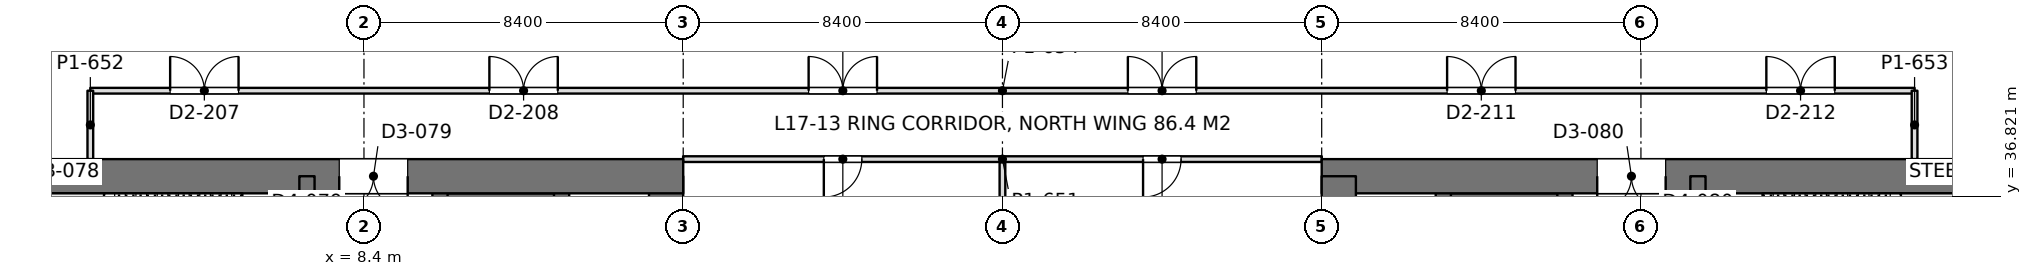
"""IFC4 building model, lengths in metres.
Left out: names, types, materials, properties, quantities, classifications, styles, units other than length and angle.
Written with IfcOpenShell. Run it as: python <this file> out.ifc"""

import sys

from ifc_helpers import new_model, si_unit, direction, frame, frame_2d, origin, place, context, subcontext, project, spatial, rectangle, extrude, element, fill, save


model = new_model("IFC4")
c1 = context("Model", 3, precision=1e-05, world=origin(), true_north=direction((0.0, 1.0)))
c2 = subcontext(c1, "Body", "Model", "MODEL_VIEW")
j1 = project(units=[si_unit("LENGTHUNIT", "METRE"), si_unit("PLANEANGLEUNIT", "RADIAN")], contexts=[c1])
p1 = place(None, origin())
s1 = spatial("IfcSite", under=j1, at=p1, CompositionType="ELEMENT")
p2 = place(p1, origin())
s2 = spatial("IfcBuilding", under=s1, at=p2, CompositionType="ELEMENT")
p3 = place(p2, frame((0.0, 0.0, 77.4)))
s3 = spatial("IfcBuildingStorey", under=s2, at=p3, CompositionType="ELEMENT", Elevation=77.4)
p4 = place(p3, frame((-1.2, 37.35, 0.0), z_axis=(0.0, 0.0, 1.0), x_axis=(1.0, 0.0, 0.0)))
e1 = element("IfcWall", 1, at=p4, inside=s3, PredefinedType="SHEAR", context=c2, shape_type="SweptSolid", body=[
    extrude(rectangle(XDim=18.0, YDim=0.9, at=frame_2d((9.0, 0.0))), origin(), (0.0, 0.0, 1.0), 4.5),
])
p5 = place(p4, frame((8.95, 0.0, 0.0)))
e2 = element("IfcOpeningElement", 2, at=p5, cuts=e1, PredefinedType="OPENING", context=c2, shape_type="SweptSolid", body=[
    extrude(rectangle(XDim=1.8, YDim=2.4, at=frame_2d((0.9, 1.2))), frame((0.0, 0.46, 0.0), z_axis=(0.0, -1.0, 0.0), x_axis=(1.0, 0.0, 0.0)), (0.0, 0.0, 1.0), 0.92),
])
p6 = place(p3, frame((16.35, 13.05, 0.0), z_axis=(0.0, 0.0, 1.0), x_axis=(0.0, 1.0, 0.0)))
e3 = element("IfcWall", 3, at=p6, inside=s3, PredefinedType="SHEAR", context=c2, shape_type="SweptSolid", body=[
    extrude(rectangle(XDim=24.3, YDim=0.9, at=frame_2d((12.15, 0.0))), origin(), (0.0, 0.0, 1.0), 4.5),
])
p7 = place(p3, frame((6.9, 13.05, 0.0), z_axis=(0.0, 0.0, 1.0), x_axis=(0.0, 1.0, 0.0)))
e4 = element("IfcWall", 4, at=p7, inside=s3, PredefinedType="SHEAR", context=c2, shape_type="SweptSolid", body=[
    extrude(rectangle(XDim=24.3, YDim=0.4, at=frame_2d((12.15, 0.0))), origin(), (0.0, 0.0, 1.0), 4.5),
])
p8 = place(p7, frame((1.3, 0.0, 0.0)))
e5 = element("IfcOpeningElement", 5, at=p8, cuts=e4, PredefinedType="OPENING", context=c2, shape_type="SweptSolid", body=[
    extrude(rectangle(XDim=1.0, YDim=2.2, at=frame_2d((0.5, 1.1))), frame((0.0, 0.21, 0.0), z_axis=(0.0, -1.0, 0.0), x_axis=(1.0, 0.0, 0.0)), (0.0, 0.0, 1.0), 0.42),
])
p9 = place(p7, frame((22.0, 0.0, 0.0)))
e6 = element("IfcOpeningElement", 6, at=p9, cuts=e4, PredefinedType="OPENING", context=c2, shape_type="SweptSolid", body=[
    extrude(rectangle(XDim=1.0, YDim=2.2, at=frame_2d((0.5, 1.1))), frame((0.0, 0.21, 0.0), z_axis=(0.0, -1.0, 0.0), x_axis=(1.0, 0.0, 0.0)), (0.0, 0.0, 1.0), 0.42),
])
p10 = place(p7, frame((5.55, 0.0, 0.0)))
e7 = element("IfcOpeningElement", 7, at=p10, cuts=e4, PredefinedType="OPENING", context=c2, shape_type="SweptSolid", body=[
    extrude(rectangle(XDim=1.0, YDim=2.2, at=frame_2d((0.5, 1.1))), frame((0.0, 0.21, 0.0), z_axis=(0.0, -1.0, 0.0), x_axis=(1.0, 0.0, 0.0)), (0.0, 0.0, 1.0), 0.42),
])
p11 = place(p7, frame((9.55, 0.0, 0.0)))
e8 = element("IfcOpeningElement", 8, at=p11, cuts=e4, PredefinedType="OPENING", context=c2, shape_type="SweptSolid", body=[
    extrude(rectangle(XDim=1.0, YDim=2.2, at=frame_2d((0.5, 1.1))), frame((0.0, 0.21, 0.0), z_axis=(0.0, -1.0, 0.0), x_axis=(1.0, 0.0, 0.0)), (0.0, 0.0, 1.0), 0.42),
])
p12 = place(p7, frame((12.8, 0.0, 0.0)))
e9 = element("IfcOpeningElement", 9, at=p12, cuts=e4, PredefinedType="OPENING", context=c2, shape_type="SweptSolid", body=[
    extrude(rectangle(XDim=1.1, YDim=2.2, at=frame_2d((0.55, 1.1))), frame((0.0, 0.21, 0.0), z_axis=(0.0, -1.0, 0.0), x_axis=(1.0, 0.0, 0.0)), (0.0, 0.0, 1.0), 0.42),
])
p13 = place(p7, frame((15.538, 0.0, 0.0)))
e10 = element("IfcOpeningElement", 10, at=p13, cuts=e4, PredefinedType="OPENING", context=c2, shape_type="SweptSolid", body=[
    extrude(rectangle(XDim=1.1, YDim=2.2, at=frame_2d((0.55, 1.1))), frame((0.0, 0.21, 0.0), z_axis=(0.0, -1.0, 0.0), x_axis=(1.0, 0.0, 0.0)), (0.0, 0.0, 1.0), 0.42),
])
p14 = place(p7, frame((18.262, 0.0, 0.0)))
e11 = element("IfcOpeningElement", 11, at=p14, cuts=e4, PredefinedType="OPENING", context=c2, shape_type="SweptSolid", body=[
    extrude(rectangle(XDim=1.1, YDim=2.2, at=frame_2d((0.55, 1.1))), frame((0.0, 0.21, 0.0), z_axis=(0.0, -1.0, 0.0), x_axis=(1.0, 0.0, 0.0)), (0.0, 0.0, 1.0), 0.42),
])
p15 = place(p3, frame((10.4, 13.05, 0.0), z_axis=(0.0, 0.0, 1.0), x_axis=(0.0, 1.0, 0.0)))
e12 = element("IfcWall", 12, at=p15, inside=s3, PredefinedType="SHEAR", context=c2, shape_type="SweptSolid", body=[
    extrude(rectangle(XDim=24.3, YDim=0.4, at=frame_2d((12.15, 0.0))), origin(), (0.0, 0.0, 1.0), 4.5),
])
p16 = place(p15, frame((1.5, 0.0, 0.0)))
e13 = element("IfcOpeningElement", 13, at=p16, cuts=e12, PredefinedType="OPENING", context=c2, shape_type="SweptSolid", body=[
    extrude(rectangle(XDim=1.1, YDim=2.2, at=frame_2d((0.55, 1.1))), frame((0.0, 0.21, 0.0), z_axis=(0.0, -1.0, 0.0), x_axis=(1.0, 0.0, 0.0)), (0.0, 0.0, 1.0), 0.42),
])
p17 = place(p15, frame((4.35, 0.0, 0.0)))
e14 = element("IfcOpeningElement", 14, at=p17, cuts=e12, PredefinedType="OPENING", context=c2, shape_type="SweptSolid", body=[
    extrude(rectangle(XDim=1.1, YDim=2.2, at=frame_2d((0.55, 1.1))), frame((0.0, 0.21, 0.0), z_axis=(0.0, -1.0, 0.0), x_axis=(1.0, 0.0, 0.0)), (0.0, 0.0, 1.0), 0.42),
])
p18 = place(p15, frame((7.2, 0.0, 0.0)))
e15 = element("IfcOpeningElement", 15, at=p18, cuts=e12, PredefinedType="OPENING", context=c2, shape_type="SweptSolid", body=[
    extrude(rectangle(XDim=1.1, YDim=2.2, at=frame_2d((0.55, 1.1))), frame((0.0, 0.21, 0.0), z_axis=(0.0, -1.0, 0.0), x_axis=(1.0, 0.0, 0.0)), (0.0, 0.0, 1.0), 0.42),
])
p19 = place(p15, frame((21.45, 0.0, 0.0)))
e16 = element("IfcOpeningElement", 16, at=p19, cuts=e12, PredefinedType="OPENING", context=c2, shape_type="SweptSolid", body=[
    extrude(rectangle(XDim=1.1, YDim=2.2, at=frame_2d((0.55, 1.1))), frame((0.0, 0.21, 0.0), z_axis=(0.0, -1.0, 0.0), x_axis=(1.0, 0.0, 0.0)), (0.0, 0.0, 1.0), 0.42),
])
p20 = place(p3, frame((13.6, 13.05, 0.0), z_axis=(0.0, 0.0, 1.0), x_axis=(0.0, 1.0, 0.0)))
e17 = element("IfcWall", 17, at=p20, inside=s3, PredefinedType="SHEAR", context=c2, shape_type="SweptSolid", body=[
    extrude(rectangle(XDim=24.3, YDim=0.4, at=frame_2d((12.15, 0.0))), origin(), (0.0, 0.0, 1.0), 4.5),
])
p21 = place(p3, frame((10.4, 36.625, 0.0), z_axis=(0.0, 0.0, 1.0), x_axis=(1.0, 0.0, 0.0)))
e18 = element("IfcWall", 18, at=p21, inside=s3, PredefinedType="SHEAR", context=c2, shape_type="SweptSolid", body=[
    extrude(rectangle(XDim=3.2, YDim=0.55, at=frame_2d((1.6, 0.0))), origin(), (0.0, 0.0, 1.0), 4.5),
])
p22 = place(p3, frame((33.6, 37.35, 0.0), z_axis=(0.0, 0.0, 1.0), x_axis=(1.0, 0.0, 0.0)))
e19 = element("IfcWall", 19, at=p22, inside=s3, PredefinedType="SHEAR", context=c2, shape_type="SweptSolid", body=[
    extrude(rectangle(XDim=18.0, YDim=0.9, at=frame_2d((9.0, 0.0))), origin(), (0.0, 0.0, 1.0), 4.5),
])
p23 = place(p22, frame((7.25, 0.0, 0.0)))
e20 = element("IfcOpeningElement", 20, at=p23, cuts=e19, PredefinedType="OPENING", context=c2, shape_type="SweptSolid", body=[
    extrude(rectangle(XDim=1.8, YDim=2.4, at=frame_2d((0.9, 1.2))), frame((0.0, 0.46, 0.0), z_axis=(0.0, -1.0, 0.0), x_axis=(1.0, 0.0, 0.0)), (0.0, 0.0, 1.0), 0.92),
])
p24 = place(p3, frame((34.05, 13.05, 0.0), z_axis=(0.0, 0.0, 1.0), x_axis=(0.0, 1.0, 0.0)))
e21 = element("IfcWall", 21, at=p24, inside=s3, PredefinedType="SHEAR", context=c2, shape_type="SweptSolid", body=[
    extrude(rectangle(XDim=24.3, YDim=0.9, at=frame_2d((12.15, 0.0))), origin(), (0.0, 0.0, 1.0), 4.5),
])
p25 = place(p3, frame((43.5, 13.05, 0.0), z_axis=(0.0, 0.0, 1.0), x_axis=(0.0, 1.0, 0.0)))
e22 = element("IfcWall", 22, at=p25, inside=s3, PredefinedType="SHEAR", context=c2, shape_type="SweptSolid", body=[
    extrude(rectangle(XDim=24.3, YDim=0.4, at=frame_2d((12.15, 0.0))), origin(), (0.0, 0.0, 1.0), 4.5),
])
p26 = place(p25, frame((1.3, 0.0, 0.0)))
e23 = element("IfcOpeningElement", 23, at=p26, cuts=e22, PredefinedType="OPENING", context=c2, shape_type="SweptSolid", body=[
    extrude(rectangle(XDim=1.0, YDim=2.2, at=frame_2d((0.5, 1.1))), frame((0.0, 0.21, 0.0), z_axis=(0.0, -1.0, 0.0), x_axis=(1.0, 0.0, 0.0)), (0.0, 0.0, 1.0), 0.42),
])
p27 = place(p25, frame((22.0, 0.0, 0.0)))
e24 = element("IfcOpeningElement", 24, at=p27, cuts=e22, PredefinedType="OPENING", context=c2, shape_type="SweptSolid", body=[
    extrude(rectangle(XDim=1.0, YDim=2.2, at=frame_2d((0.5, 1.1))), frame((0.0, 0.21, 0.0), z_axis=(0.0, -1.0, 0.0), x_axis=(1.0, 0.0, 0.0)), (0.0, 0.0, 1.0), 0.42),
])
p28 = place(p25, frame((5.55, 0.0, 0.0)))
e25 = element("IfcOpeningElement", 25, at=p28, cuts=e22, PredefinedType="OPENING", context=c2, shape_type="SweptSolid", body=[
    extrude(rectangle(XDim=1.0, YDim=2.2, at=frame_2d((0.5, 1.1))), frame((0.0, 0.21, 0.0), z_axis=(0.0, -1.0, 0.0), x_axis=(1.0, 0.0, 0.0)), (0.0, 0.0, 1.0), 0.42),
])
p29 = place(p25, frame((9.55, 0.0, 0.0)))
e26 = element("IfcOpeningElement", 26, at=p29, cuts=e22, PredefinedType="OPENING", context=c2, shape_type="SweptSolid", body=[
    extrude(rectangle(XDim=1.0, YDim=2.2, at=frame_2d((0.5, 1.1))), frame((0.0, 0.21, 0.0), z_axis=(0.0, -1.0, 0.0), x_axis=(1.0, 0.0, 0.0)), (0.0, 0.0, 1.0), 0.42),
])
p30 = place(p25, frame((12.8, 0.0, 0.0)))
e27 = element("IfcOpeningElement", 27, at=p30, cuts=e22, PredefinedType="OPENING", context=c2, shape_type="SweptSolid", body=[
    extrude(rectangle(XDim=1.1, YDim=2.2, at=frame_2d((0.55, 1.1))), frame((0.0, 0.21, 0.0), z_axis=(0.0, -1.0, 0.0), x_axis=(1.0, 0.0, 0.0)), (0.0, 0.0, 1.0), 0.42),
])
p31 = place(p25, frame((15.538, 0.0, 0.0)))
e28 = element("IfcOpeningElement", 28, at=p31, cuts=e22, PredefinedType="OPENING", context=c2, shape_type="SweptSolid", body=[
    extrude(rectangle(XDim=1.1, YDim=2.2, at=frame_2d((0.55, 1.1))), frame((0.0, 0.21, 0.0), z_axis=(0.0, -1.0, 0.0), x_axis=(1.0, 0.0, 0.0)), (0.0, 0.0, 1.0), 0.42),
])
p32 = place(p25, frame((18.262, 0.0, 0.0)))
e29 = element("IfcOpeningElement", 29, at=p32, cuts=e22, PredefinedType="OPENING", context=c2, shape_type="SweptSolid", body=[
    extrude(rectangle(XDim=1.1, YDim=2.2, at=frame_2d((0.55, 1.1))), frame((0.0, 0.21, 0.0), z_axis=(0.0, -1.0, 0.0), x_axis=(1.0, 0.0, 0.0)), (0.0, 0.0, 1.0), 0.42),
])
p33 = place(p3, frame((40.0, 13.05, 0.0), z_axis=(0.0, 0.0, 1.0), x_axis=(0.0, 1.0, 0.0)))
e30 = element("IfcWall", 30, at=p33, inside=s3, PredefinedType="SHEAR", context=c2, shape_type="SweptSolid", body=[
    extrude(rectangle(XDim=24.3, YDim=0.4, at=frame_2d((12.15, 0.0))), origin(), (0.0, 0.0, 1.0), 4.5),
])
p34 = place(p33, frame((1.5, 0.0, 0.0)))
e31 = element("IfcOpeningElement", 31, at=p34, cuts=e30, PredefinedType="OPENING", context=c2, shape_type="SweptSolid", body=[
    extrude(rectangle(XDim=1.1, YDim=2.2, at=frame_2d((0.55, 1.1))), frame((0.0, 0.21, 0.0), z_axis=(0.0, -1.0, 0.0), x_axis=(1.0, 0.0, 0.0)), (0.0, 0.0, 1.0), 0.42),
])
p35 = place(p33, frame((4.35, 0.0, 0.0)))
e32 = element("IfcOpeningElement", 32, at=p35, cuts=e30, PredefinedType="OPENING", context=c2, shape_type="SweptSolid", body=[
    extrude(rectangle(XDim=1.1, YDim=2.2, at=frame_2d((0.55, 1.1))), frame((0.0, 0.21, 0.0), z_axis=(0.0, -1.0, 0.0), x_axis=(1.0, 0.0, 0.0)), (0.0, 0.0, 1.0), 0.42),
])
p36 = place(p33, frame((7.2, 0.0, 0.0)))
e33 = element("IfcOpeningElement", 33, at=p36, cuts=e30, PredefinedType="OPENING", context=c2, shape_type="SweptSolid", body=[
    extrude(rectangle(XDim=1.1, YDim=2.2, at=frame_2d((0.55, 1.1))), frame((0.0, 0.21, 0.0), z_axis=(0.0, -1.0, 0.0), x_axis=(1.0, 0.0, 0.0)), (0.0, 0.0, 1.0), 0.42),
])
p37 = place(p33, frame((21.45, 0.0, 0.0)))
e34 = element("IfcOpeningElement", 34, at=p37, cuts=e30, PredefinedType="OPENING", context=c2, shape_type="SweptSolid", body=[
    extrude(rectangle(XDim=1.1, YDim=2.2, at=frame_2d((0.55, 1.1))), frame((0.0, 0.21, 0.0), z_axis=(0.0, -1.0, 0.0), x_axis=(1.0, 0.0, 0.0)), (0.0, 0.0, 1.0), 0.42),
])
p38 = place(p3, frame((36.8, 13.05, 0.0), z_axis=(0.0, 0.0, 1.0), x_axis=(0.0, 1.0, 0.0)))
e35 = element("IfcWall", 35, at=p38, inside=s3, PredefinedType="SHEAR", context=c2, shape_type="SweptSolid", body=[
    extrude(rectangle(XDim=24.3, YDim=0.4, at=frame_2d((12.15, 0.0))), origin(), (0.0, 0.0, 1.0), 4.5),
])
p39 = place(p3, frame((40.0, 36.625, 0.0), z_axis=(0.0, 0.0, 1.0), x_axis=(-1.0, 0.0, 0.0)))
e36 = element("IfcWall", 36, at=p39, inside=s3, PredefinedType="SHEAR", context=c2, shape_type="SweptSolid", body=[
    extrude(rectangle(XDim=3.2, YDim=0.55, at=frame_2d((1.6, 0.0))), origin(), (0.0, 0.0, 1.0), 4.5),
])
p40 = place(p3, frame((1.2, 39.6, 0.0), z_axis=(0.0, 0.0, 1.0), x_axis=(1.0, 0.0, 0.0)))
e37 = element("IfcWall", 37, at=p40, inside=s3, PredefinedType="PARTITIONING", context=c2, shape_type="SweptSolid", body=[
    extrude(rectangle(XDim=48.0, YDim=0.15, at=frame_2d((24.0, 0.0))), origin(), (0.0, 0.0, 1.0), 3.74),
])
p41 = place(p40, frame((2.1, 0.0, 0.0)))
e38 = element("IfcOpeningElement", 38, at=p41, cuts=e37, PredefinedType="OPENING", context=c2, shape_type="SweptSolid", body=[
    extrude(rectangle(XDim=1.8, YDim=2.2, at=frame_2d((0.9, 1.1))), frame((0.0, 0.085, 0.0), z_axis=(0.0, -1.0, 0.0), x_axis=(1.0, 0.0, 0.0)), (0.0, 0.0, 1.0), 0.17),
])
p42 = place(p40, frame((10.5, 0.0, 0.0)))
e39 = element("IfcOpeningElement", 39, at=p42, cuts=e37, PredefinedType="OPENING", context=c2, shape_type="SweptSolid", body=[
    extrude(rectangle(XDim=1.8, YDim=2.2, at=frame_2d((0.9, 1.1))), frame((0.0, 0.085, 0.0), z_axis=(0.0, -1.0, 0.0), x_axis=(1.0, 0.0, 0.0)), (0.0, 0.0, 1.0), 0.17),
])
p43 = place(p40, frame((18.9, 0.0, 0.0)))
e40 = element("IfcOpeningElement", 40, at=p43, cuts=e37, PredefinedType="OPENING", context=c2, shape_type="SweptSolid", body=[
    extrude(rectangle(XDim=1.8, YDim=2.2, at=frame_2d((0.9, 1.1))), frame((0.0, 0.085, 0.0), z_axis=(0.0, -1.0, 0.0), x_axis=(1.0, 0.0, 0.0)), (0.0, 0.0, 1.0), 0.17),
])
p44 = place(p40, frame((27.3, 0.0, 0.0)))
e41 = element("IfcOpeningElement", 41, at=p44, cuts=e37, PredefinedType="OPENING", context=c2, shape_type="SweptSolid", body=[
    extrude(rectangle(XDim=1.8, YDim=2.2, at=frame_2d((0.9, 1.1))), frame((0.0, 0.085, 0.0), z_axis=(0.0, -1.0, 0.0), x_axis=(1.0, 0.0, 0.0)), (0.0, 0.0, 1.0), 0.17),
])
p45 = place(p40, frame((35.7, 0.0, 0.0)))
e42 = element("IfcOpeningElement", 42, at=p45, cuts=e37, PredefinedType="OPENING", context=c2, shape_type="SweptSolid", body=[
    extrude(rectangle(XDim=1.8, YDim=2.2, at=frame_2d((0.9, 1.1))), frame((0.0, 0.085, 0.0), z_axis=(0.0, -1.0, 0.0), x_axis=(1.0, 0.0, 0.0)), (0.0, 0.0, 1.0), 0.17),
])
p46 = place(p40, frame((44.1, 0.0, 0.0)))
e43 = element("IfcOpeningElement", 43, at=p46, cuts=e37, PredefinedType="OPENING", context=c2, shape_type="SweptSolid", body=[
    extrude(rectangle(XDim=1.8, YDim=2.2, at=frame_2d((0.9, 1.1))), frame((0.0, 0.085, 0.0), z_axis=(0.0, -1.0, 0.0), x_axis=(1.0, 0.0, 0.0)), (0.0, 0.0, 1.0), 0.17),
])
for number, where, z_axis, x_axis in (
    (44, (1.2, 37.8, 0.0), (0.0, 0.0, 1.0), (0.0, 1.0, 0.0)),
    (45, (49.2, 37.8, 0.0), (0.0, 0.0, 1.0), (0.0, 1.0, 0.0)),
):
    element("IfcWall", number, at=place(p3, frame(where, z_axis=z_axis, x_axis=x_axis)), inside=s3, PredefinedType="PARTITIONING", context=c2, shape_type="SweptSolid", body=[
        extrude(rectangle(XDim=1.8, YDim=0.15, at=frame_2d((0.9, 0.0))), origin(), (0.0, 0.0, 1.0), 4.34),
    ])
p47 = place(p3, frame((16.798, 37.8, 0.0), z_axis=(0.0, 0.0, 1.0), x_axis=(1.0, 0.0, 0.0)))
e46 = element("IfcWall", 46, at=p47, inside=s3, PredefinedType="PARTITIONING", context=c2, shape_type="SweptSolid", body=[
    extrude(rectangle(XDim=16.804, YDim=0.15, at=frame_2d((8.402, 0.0))), origin(), (0.0, 0.0, 1.0), 3.74),
])
p48 = place(p47, frame((3.702, 0.0, 0.0)))
e47 = element("IfcOpeningElement", 47, at=p48, cuts=e46, PredefinedType="OPENING", context=c2, shape_type="SweptSolid", body=[
    extrude(rectangle(XDim=1.0, YDim=2.2, at=frame_2d((0.5, 1.1))), frame((0.0, 0.085, 0.0), z_axis=(0.0, -1.0, 0.0), x_axis=(1.0, 0.0, 0.0)), (0.0, 0.0, 1.0), 0.17),
])
p49 = place(p47, frame((12.102, 0.0, 0.0)))
e48 = element("IfcOpeningElement", 48, at=p49, cuts=e46, PredefinedType="OPENING", context=c2, shape_type="SweptSolid", body=[
    extrude(rectangle(XDim=1.0, YDim=2.2, at=frame_2d((0.5, 1.1))), frame((0.0, 0.085, 0.0), z_axis=(0.0, -1.0, 0.0), x_axis=(1.0, 0.0, 0.0)), (0.0, 0.0, 1.0), 0.17),
])
p50 = place(p3, frame((25.2, 34.199, 0.0), z_axis=(0.0, 0.0, 1.0), x_axis=(0.0, 1.0, 0.0)))
e49 = element("IfcWall", 49, at=p50, inside=s3, PredefinedType="PARTITIONING", context=c2, shape_type="SweptSolid", body=[
    extrude(rectangle(XDim=3.527, YDim=0.15, at=frame_2d((1.764, 0.0))), origin(), (0.0, 0.0, 1.0), 3.74),
])
p51 = place(p5, frame((1.8, 0.0, 0.0), z_axis=(0.0, 0.0, 1.0), x_axis=(-1.0, 0.0, 0.0)))
e50 = element("IfcDoor", 50, at=p51, inside=s3, OperationType="DOUBLE_DOOR_SINGLE_SWING", PredefinedType="DOOR", context=c2, shape_type="SweptSolid", body=[
    extrude(rectangle(XDim=1.8, YDim=2.4, at=frame_2d((0.9, 1.2))), frame((0.0, 0.025, 0.0), z_axis=(0.0, -1.0, 0.0), x_axis=(1.0, 0.0, 0.0)), (0.0, 0.0, 1.0), 0.05),
])
fill(e2, e50)
p52 = place(p23, frame((1.8, 0.0, 0.0), z_axis=(0.0, 0.0, 1.0), x_axis=(-1.0, 0.0, 0.0)))
e51 = element("IfcDoor", 51, at=p52, inside=s3, OperationType="DOUBLE_DOOR_SINGLE_SWING", PredefinedType="DOOR", context=c2, shape_type="SweptSolid", body=[
    extrude(rectangle(XDim=1.8, YDim=2.4, at=frame_2d((0.9, 1.2))), frame((0.0, 0.025, 0.0), z_axis=(0.0, -1.0, 0.0), x_axis=(1.0, 0.0, 0.0)), (0.0, 0.0, 1.0), 0.05),
])
fill(e20, e51)
p53 = place(p41, origin())
e52 = element("IfcDoor", 52, at=p53, inside=s3, OperationType="DOUBLE_DOOR_SINGLE_SWING", PredefinedType="DOOR", context=c2, shape_type="SweptSolid", body=[
    extrude(rectangle(XDim=1.8, YDim=2.2, at=frame_2d((0.9, 1.1))), frame((0.0, 0.025, 0.0), z_axis=(0.0, -1.0, 0.0), x_axis=(1.0, 0.0, 0.0)), (0.0, 0.0, 1.0), 0.05),
])
fill(e38, e52)
p54 = place(p42, origin())
e53 = element("IfcDoor", 53, at=p54, inside=s3, OperationType="DOUBLE_DOOR_SINGLE_SWING", PredefinedType="DOOR", context=c2, shape_type="SweptSolid", body=[
    extrude(rectangle(XDim=1.8, YDim=2.2, at=frame_2d((0.9, 1.1))), frame((0.0, 0.025, 0.0), z_axis=(0.0, -1.0, 0.0), x_axis=(1.0, 0.0, 0.0)), (0.0, 0.0, 1.0), 0.05),
])
fill(e39, e53)
p55 = place(p43, origin())
e54 = element("IfcDoor", 54, at=p55, inside=s3, OperationType="DOUBLE_DOOR_SINGLE_SWING", PredefinedType="DOOR", context=c2, shape_type="SweptSolid", body=[
    extrude(rectangle(XDim=1.8, YDim=2.2, at=frame_2d((0.9, 1.1))), frame((0.0, 0.025, 0.0), z_axis=(0.0, -1.0, 0.0), x_axis=(1.0, 0.0, 0.0)), (0.0, 0.0, 1.0), 0.05),
])
fill(e40, e54)
p56 = place(p44, origin())
e55 = element("IfcDoor", 55, at=p56, inside=s3, OperationType="DOUBLE_DOOR_SINGLE_SWING", PredefinedType="DOOR", context=c2, shape_type="SweptSolid", body=[
    extrude(rectangle(XDim=1.8, YDim=2.2, at=frame_2d((0.9, 1.1))), frame((0.0, 0.025, 0.0), z_axis=(0.0, -1.0, 0.0), x_axis=(1.0, 0.0, 0.0)), (0.0, 0.0, 1.0), 0.05),
])
fill(e41, e55)
p57 = place(p45, origin())
e56 = element("IfcDoor", 56, at=p57, inside=s3, OperationType="DOUBLE_DOOR_SINGLE_SWING", PredefinedType="DOOR", context=c2, shape_type="SweptSolid", body=[
    extrude(rectangle(XDim=1.8, YDim=2.2, at=frame_2d((0.9, 1.1))), frame((0.0, 0.025, 0.0), z_axis=(0.0, -1.0, 0.0), x_axis=(1.0, 0.0, 0.0)), (0.0, 0.0, 1.0), 0.05),
])
fill(e42, e56)
p58 = place(p46, origin())
e57 = element("IfcDoor", 57, at=p58, inside=s3, OperationType="DOUBLE_DOOR_SINGLE_SWING", PredefinedType="DOOR", context=c2, shape_type="SweptSolid", body=[
    extrude(rectangle(XDim=1.8, YDim=2.2, at=frame_2d((0.9, 1.1))), frame((0.0, 0.025, 0.0), z_axis=(0.0, -1.0, 0.0), x_axis=(1.0, 0.0, 0.0)), (0.0, 0.0, 1.0), 0.05),
])
fill(e43, e57)
p59 = place(p48, frame((1.0, 0.0, 0.0), z_axis=(0.0, 0.0, 1.0), x_axis=(-1.0, 0.0, 0.0)))
e58 = element("IfcDoor", 58, at=p59, inside=s3, OperationType="SINGLE_SWING_RIGHT", PredefinedType="DOOR", context=c2, shape_type="SweptSolid", body=[
    extrude(rectangle(XDim=1.0, YDim=2.2, at=frame_2d((0.5, 1.1))), frame((0.0, 0.025, 0.0), z_axis=(0.0, -1.0, 0.0), x_axis=(1.0, 0.0, 0.0)), (0.0, 0.0, 1.0), 0.05),
])
fill(e47, e58)
p60 = place(p49, frame((1.0, 0.0, 0.0), z_axis=(0.0, 0.0, 1.0), x_axis=(-1.0, 0.0, 0.0)))
e59 = element("IfcDoor", 59, at=p60, inside=s3, OperationType="SINGLE_SWING_RIGHT", PredefinedType="DOOR", context=c2, shape_type="SweptSolid", body=[
    extrude(rectangle(XDim=1.0, YDim=2.2, at=frame_2d((0.5, 1.1))), frame((0.0, 0.025, 0.0), z_axis=(0.0, -1.0, 0.0), x_axis=(1.0, 0.0, 0.0)), (0.0, 0.0, 1.0), 0.05),
])
fill(e48, e59)
save(model, sys.argv[1])
